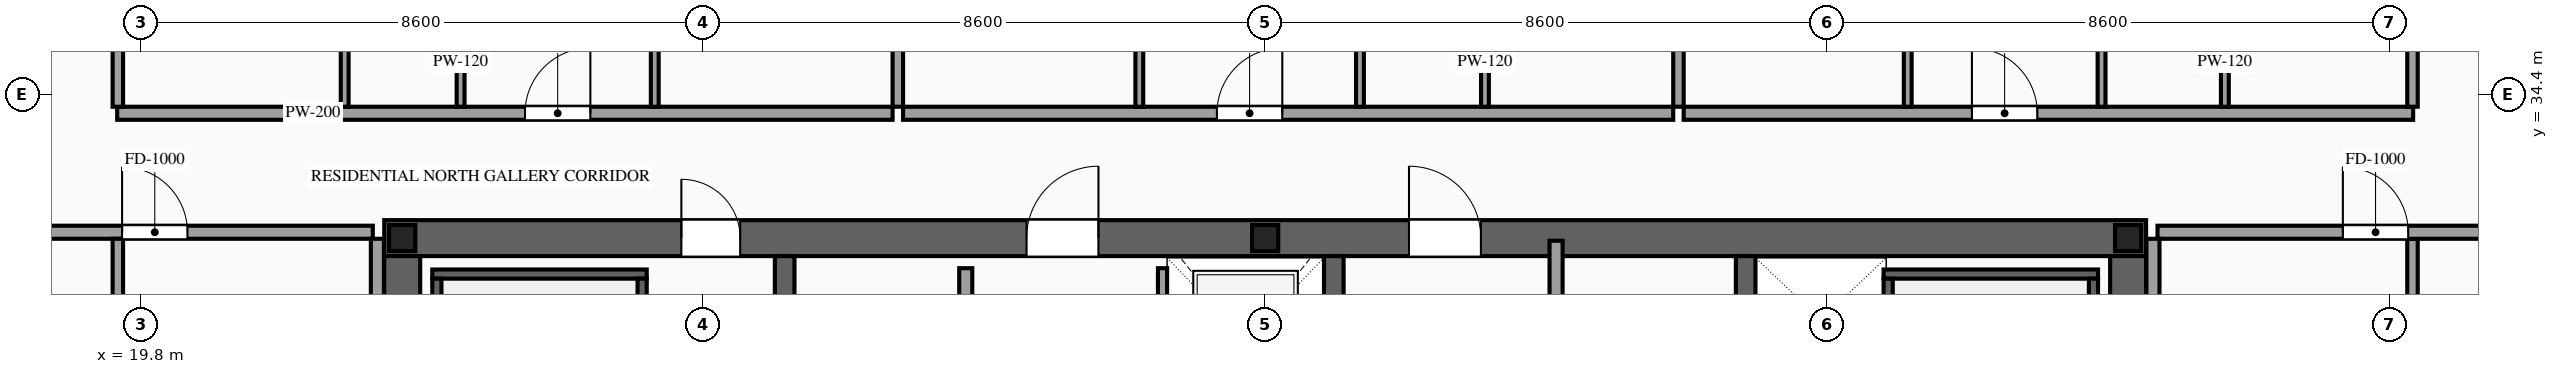
"""IFC4 building model, lengths in metres.
Left out: names, types, materials, properties, quantities, classifications, styles, units other than length and angle.
Written with IfcOpenShell. Run it as: python <this file> out.ifc"""

import sys

from ifc_helpers import new_model, si_unit, direction, frame, frame_2d, origin, origin_2d, place, context, subcontext, project, spatial, rectangle, i_section, extrude, source, transform, mapped, element, fill, save


model = new_model("IFC4")
c1 = context("Model", 3, precision=1e-05, world=origin(), true_north=direction((0.0, 1.0)))
c2 = subcontext(c1, "Body", "Model", "MODEL_VIEW")
j1 = project(units=[si_unit("LENGTHUNIT", "METRE"), si_unit("PLANEANGLEUNIT", "RADIAN")], contexts=[c1])
p1 = place(None, origin())
s1 = spatial("IfcSite", under=j1, at=p1, CompositionType="ELEMENT")
p2 = place(p1, origin())
s2 = spatial("IfcBuilding", under=s1, at=p2, CompositionType="ELEMENT")
p3 = place(p2, frame((0.0, 0.0, 248.6)))
s3 = spatial("IfcBuildingStorey", under=s2, at=p3, CompositionType="ELEMENT", Elevation=248.6)
p4 = place(p3, frame((23.525, 32.2, 0.0), z_axis=(0.0, 0.0, 1.0), x_axis=(1.0, 0.0, 0.0)))
e1 = element("IfcWall", 1, at=p4, inside=s3, PredefinedType="SHEAR", context=c2, shape_type="SweptSolid", body=[
    extrude(rectangle(XDim=26.95, YDim=0.55, at=frame_2d((13.475, 0.0))), origin(), (0.0, 0.0, 1.0), 3.5),
])
p5 = place(p4, frame((4.545, 0.0, 0.0)))
e2 = element("IfcOpeningElement", 2, at=p5, cuts=e1, PredefinedType="OPENING", context=c2, shape_type="SweptSolid", body=[
    extrude(rectangle(XDim=0.9, YDim=2.15, at=frame_2d((0.45, 1.075))), frame((0.0, 0.29, 0.0), z_axis=(0.0, -1.0, 0.0), x_axis=(1.0, 0.0, 0.0)), (0.0, 0.0, 1.0), 0.58),
])
p6 = place(p4, frame((9.825, 0.0, 0.0)))
e3 = element("IfcOpeningElement", 3, at=p6, cuts=e1, PredefinedType="OPENING", context=c2, shape_type="SweptSolid", body=[
    extrude(rectangle(XDim=1.1, YDim=2.2, at=frame_2d((0.55, 1.1))), frame((0.0, 0.29, 0.0), z_axis=(0.0, -1.0, 0.0), x_axis=(1.0, 0.0, 0.0)), (0.0, 0.0, 1.0), 0.58),
])
p7 = place(p4, frame((15.675, 0.0, 0.0)))
e4 = element("IfcOpeningElement", 4, at=p7, cuts=e1, PredefinedType="OPENING", context=c2, shape_type="SweptSolid", body=[
    extrude(rectangle(XDim=1.1, YDim=2.2, at=frame_2d((0.55, 1.1))), frame((0.0, 0.29, 0.0), z_axis=(0.0, -1.0, 0.0), x_axis=(1.0, 0.0, 0.0)), (0.0, 0.0, 1.0), 0.58),
])
m1 = source(origin(), c2, "Body", "SweptSolid", [
    extrude(rectangle(XDim=12.25, YDim=0.55, at=frame_2d((6.125, 0.0))), origin(), (0.0, 0.0, 1.0), 3.5),
])
for number, where, z_axis, x_axis in (
    (5, (23.8, 19.675, 0.0), (0.0, 0.0, 1.0), (0.0, 1.0, 0.0)),
    (6, (50.2, 19.675, 0.0), (0.0, 0.0, 1.0), (0.0, 1.0, 0.0)),
):
    element("IfcWall", number, at=place(p3, frame(where, z_axis=z_axis, x_axis=x_axis)), inside=s3, PredefinedType="SHEAR", context=c2, shape_type="MappedRepresentation", body=[
        mapped(m1, transform((0.0, 0.0, 0.0), scale=1.0)),
    ])
m2 = source(origin(), c2, "Body", "SweptSolid", [
    extrude(rectangle(XDim=12.25, YDim=0.3, at=frame_2d((6.125, 0.0))), origin(), (0.0, 0.0, 1.0), 3.5),
])
for number, where, z_axis, x_axis in (
    (7, (29.65, 19.675, 0.0), (0.0, 0.0, 1.0), (0.0, 1.0, 0.0)),
    (8, (38.05, 19.675, 0.0), (0.0, 0.0, 1.0), (0.0, 1.0, 0.0)),
    (9, (44.35, 19.675, 0.0), (0.0, 0.0, 1.0), (0.0, 1.0, 0.0)),
):
    element("IfcWall", number, at=place(p3, frame(where, z_axis=z_axis, x_axis=x_axis)), inside=s3, PredefinedType="SOLIDWALL", context=c2, shape_type="MappedRepresentation", body=[
        mapped(m2, transform((0.0, 0.0, 0.0), scale=1.0)),
    ])
m3 = source(origin(), c2, "Body", "SweptSolid", [
    extrude(i_section(OverallWidth=0.4, OverallDepth=0.4, WebThickness=0.013, FlangeThickness=0.021, at=origin_2d()), origin(), (0.0, 0.0, 1.0), 3.5),
])
for number, where, z_axis, x_axis in (
    (10, (23.8, 32.2, 0.0), (0.0, 0.0, 1.0), (1.0, 0.0, 0.0)),
    (11, (37.0, 32.2, 0.0), (0.0, 0.0, 1.0), (1.0, 0.0, 0.0)),
    (12, (50.2, 32.2, 0.0), (0.0, 0.0, 1.0), (1.0, 0.0, 0.0)),
):
    element("IfcColumn", number, at=place(p3, frame(where, z_axis=z_axis, x_axis=x_axis)), inside=s3, PredefinedType="COLUMN", context=c2, shape_type="MappedRepresentation", body=[
        mapped(m3, transform((0.0, 0.0, 0.0), scale=1.0)),
    ])
p8 = place(p3, frame((35.43, 29.4, 0.0), z_axis=(0.0, 0.0, 1.0), x_axis=(0.0, 1.0, 0.0)))
e13 = element("IfcWall", 13, at=p8, inside=s3, PredefinedType="SOLIDWALL", context=c2, shape_type="SweptSolid", body=[
    extrude(rectangle(XDim=2.34, YDim=0.14, at=frame_2d((1.17, 0.0))), origin(), (0.0, 0.0, 1.0), 3.28),
])
p9 = place(p8, frame((0.62, 0.0, 0.0)))
e14 = element("IfcOpeningElement", 14, at=p9, cuts=e13, PredefinedType="OPENING", context=c2, shape_type="SweptSolid", body=[
    extrude(rectangle(XDim=1.1, YDim=2.2, at=frame_2d((0.55, 1.1))), frame((0.0, 0.085, 0.0), z_axis=(0.0, -1.0, 0.0), x_axis=(1.0, 0.0, 0.0)), (0.0, 0.0, 1.0), 0.17),
])
m4 = source(origin(), c2, "Body", "SweptSolid", [
    extrude(rectangle(XDim=3.28, YDim=0.14, at=frame_2d((1.64, 0.0))), origin(), (0.0, 0.0, 1.0), 3.28),
])
p10 = place(p3, frame((24.26, 31.65, 0.0), z_axis=(0.0, 0.0, 1.0), x_axis=(1.0, 0.0, 0.0)))
e15 = element("IfcWall", 15, at=p10, inside=s3, PredefinedType="SOLIDWALL", context=c2, shape_type="MappedRepresentation", body=[
    mapped(m4, transform((0.0, 0.0, 0.0), scale=1.0)),
])
m5 = source(origin(), c2, "Body", "SweptSolid", [
    extrude(rectangle(XDim=8.94, YDim=0.14, at=frame_2d((4.47, 0.0))), origin(), (0.0, 0.0, 1.0), 3.28),
])
for number, where, z_axis, x_axis in (
    (16, (24.33, 22.64, 0.0), (0.0, 0.0, 1.0), (0.0, 1.0, 0.0)),
    (17, (27.47, 22.64, 0.0), (0.0, 0.0, 1.0), (0.0, 1.0, 0.0)),
):
    element("IfcWall", number, at=place(p3, frame(where, z_axis=z_axis, x_axis=x_axis)), inside=s3, PredefinedType="SOLIDWALL", context=c2, shape_type="MappedRepresentation", body=[
        mapped(m5, transform((0.0, 0.0, 0.0), scale=1.0)),
    ])
p11 = place(p3, frame((46.46, 31.65, 0.0), z_axis=(0.0, 0.0, 1.0), x_axis=(1.0, 0.0, 0.0)))
e18 = element("IfcWall", 18, at=p11, inside=s3, PredefinedType="SOLIDWALL", context=c2, shape_type="MappedRepresentation", body=[
    mapped(m4, transform((0.0, 0.0, 0.0), scale=1.0)),
])
for number, where, z_axis, x_axis in (
    (19, (46.53, 22.64, 0.0), (0.0, 0.0, 1.0), (0.0, 1.0, 0.0)),
    (20, (49.67, 22.64, 0.0), (0.0, 0.0, 1.0), (0.0, 1.0, 0.0)),
):
    element("IfcWall", number, at=place(p3, frame(where, z_axis=z_axis, x_axis=x_axis)), inside=s3, PredefinedType="SOLIDWALL", context=c2, shape_type="MappedRepresentation", body=[
        mapped(m5, transform((0.0, 0.0, 0.0), scale=1.0)),
    ])
p12 = place(p3, frame((32.42, 19.86, 0.0), z_axis=(0.0, 0.0, 1.0), x_axis=(0.0, 1.0, 0.0)))
e21 = element("IfcWall", 21, at=p12, inside=s3, PredefinedType="PARTITIONING", context=c2, shape_type="SweptSolid", body=[
    extrude(rectangle(XDim=11.88, YDim=0.2, at=frame_2d((5.94, 0.0))), origin(), (0.0, 0.0, 1.0), 3.28),
])
p13 = place(p12, frame((5.49, 0.0, 0.0)))
e22 = element("IfcOpeningElement", 22, at=p13, cuts=e21, PredefinedType="OPENING", context=c2, shape_type="SweptSolid", body=[
    extrude(rectangle(XDim=0.9, YDim=2.15, at=frame_2d((0.45, 1.075))), frame((0.0, 0.115, 0.0), z_axis=(0.0, -1.0, 0.0), x_axis=(1.0, 0.0, 0.0)), (0.0, 0.0, 1.0), 0.23),
])
m6 = source(origin(), c2, "Body", "SweptSolid", [
    extrude(rectangle(XDim=12.72, YDim=0.2, at=frame_2d((6.36, 0.0))), origin(), (0.0, 0.0, 1.0), 3.28),
])
p14 = place(p3, frame((41.45, 19.44, 0.0), z_axis=(0.0, 0.0, 1.0), x_axis=(0.0, 1.0, 0.0)))
e23 = element("IfcWall", 23, at=p14, inside=s3, PredefinedType="PARTITIONING", context=c2, shape_type="MappedRepresentation", body=[
    mapped(m6, transform((0.0, 0.0, 0.0), scale=1.0)),
])
p15 = place(p3, frame((19.44, 34.11, 0.0), z_axis=(0.0, 0.0, 1.0), x_axis=(1.0, 0.0, 0.0)))
e24 = element("IfcWall", 24, at=p15, inside=s3, PredefinedType="PARTITIONING", context=c2, shape_type="SweptSolid", body=[
    extrude(rectangle(XDim=11.861, YDim=0.2, at=frame_2d((5.931, 0.0))), origin(), (0.0, 0.0, 1.0), 3.28),
])
p16 = place(p15, frame((6.238, 0.0, 0.0)))
e25 = element("IfcOpeningElement", 25, at=p16, cuts=e24, PredefinedType="OPENING", context=c2, shape_type="SweptSolid", body=[
    extrude(rectangle(XDim=1.0, YDim=2.2, at=frame_2d((0.5, 1.1))), frame((0.0, 0.115, 0.0), z_axis=(0.0, -1.0, 0.0), x_axis=(1.0, 0.0, 0.0)), (0.0, 0.0, 1.0), 0.23),
])
m7 = source(origin(), c2, "Body", "SweptSolid", [
    extrude(rectangle(XDim=12.04, YDim=0.16, at=frame_2d((6.02, 0.0))), origin(), (0.0, 0.0, 1.0), 3.28),
])
p17 = place(p3, frame((31.381, 34.21, 0.0), z_axis=(0.0, 0.0, 1.0), x_axis=(0.0, 1.0, 0.0)))
e26 = element("IfcWall", 26, at=p17, inside=s3, PredefinedType="PARTITIONING", context=c2, shape_type="MappedRepresentation", body=[
    mapped(m7, transform((0.0, 0.0, 0.0), scale=1.0)),
])
m8 = source(origin(), c2, "Body", "SweptSolid", [
    extrude(rectangle(XDim=4.11, YDim=0.12, at=frame_2d((2.055, 0.0))), origin(), (0.0, 0.0, 1.0), 3.28),
])
p18 = place(p3, frame((22.92, 34.21, 0.0), z_axis=(0.0, 0.0, 1.0), x_axis=(0.0, 1.0, 0.0)))
e27 = element("IfcWall", 27, at=p18, inside=s3, PredefinedType="PARTITIONING", context=c2, shape_type="MappedRepresentation", body=[
    mapped(m8, transform((0.0, 0.0, 0.0), scale=1.0)),
])
p19 = place(p3, frame((24.693, 34.21, 0.0), z_axis=(0.0, 0.0, 1.0), x_axis=(0.0, 1.0, 0.0)))
e28 = element("IfcWall", 28, at=p19, inside=s3, PredefinedType="PARTITIONING", context=c2, shape_type="SweptSolid", body=[
    extrude(rectangle(XDim=4.11, YDim=0.12, at=frame_2d((2.055, 0.0))), origin(), (0.0, 0.0, 1.0), 3.28),
])
p20 = place(p19, frame((1.63, 0.0, 0.0)))
e29 = element("IfcOpeningElement", 29, at=p20, cuts=e28, PredefinedType="OPENING", context=c2, shape_type="SweptSolid", body=[
    extrude(rectangle(XDim=0.85, YDim=2.1, at=frame_2d((0.425, 1.05))), frame((0.0, 0.075, 0.0), z_axis=(0.0, -1.0, 0.0), x_axis=(1.0, 0.0, 0.0)), (0.0, 0.0, 1.0), 0.15),
])
p21 = place(p3, frame((27.663, 34.21, 0.0), z_axis=(0.0, 0.0, 1.0), x_axis=(0.0, 1.0, 0.0)))
e30 = element("IfcWall", 30, at=p21, inside=s3, PredefinedType="PARTITIONING", context=c2, shape_type="MappedRepresentation", body=[
    mapped(m8, transform((0.0, 0.0, 0.0), scale=1.0)),
])
p22 = place(p3, frame((31.461, 34.11, 0.0), z_axis=(0.0, 0.0, 1.0), x_axis=(1.0, 0.0, 0.0)))
e31 = element("IfcWall", 31, at=p22, inside=s3, PredefinedType="PARTITIONING", context=c2, shape_type="SweptSolid", body=[
    extrude(rectangle(XDim=11.781, YDim=0.2, at=frame_2d((5.891, 0.0))), origin(), (0.0, 0.0, 1.0), 3.28),
])
p23 = place(p22, frame((4.801, 0.0, 0.0)))
e32 = element("IfcOpeningElement", 32, at=p23, cuts=e31, PredefinedType="OPENING", context=c2, shape_type="SweptSolid", body=[
    extrude(rectangle(XDim=1.0, YDim=2.2, at=frame_2d((0.5, 1.1))), frame((0.0, 0.115, 0.0), z_axis=(0.0, -1.0, 0.0), x_axis=(1.0, 0.0, 0.0)), (0.0, 0.0, 1.0), 0.23),
])
p24 = place(p3, frame((43.322, 34.21, 0.0), z_axis=(0.0, 0.0, 1.0), x_axis=(0.0, 1.0, 0.0)))
e33 = element("IfcWall", 33, at=p24, inside=s3, PredefinedType="PARTITIONING", context=c2, shape_type="MappedRepresentation", body=[
    mapped(m7, transform((0.0, 0.0, 0.0), scale=1.0)),
])
p25 = place(p3, frame((35.075, 34.21, 0.0), z_axis=(0.0, 0.0, 1.0), x_axis=(0.0, 1.0, 0.0)))
e34 = element("IfcWall", 34, at=p25, inside=s3, PredefinedType="PARTITIONING", context=c2, shape_type="MappedRepresentation", body=[
    mapped(m8, transform((0.0, 0.0, 0.0), scale=1.0)),
])
p26 = place(p3, frame((40.362, 34.21, 0.0), z_axis=(0.0, 0.0, 1.0), x_axis=(0.0, 1.0, 0.0)))
e35 = element("IfcWall", 35, at=p26, inside=s3, PredefinedType="PARTITIONING", context=c2, shape_type="SweptSolid", body=[
    extrude(rectangle(XDim=4.11, YDim=0.12, at=frame_2d((2.055, 0.0))), origin(), (0.0, 0.0, 1.0), 3.28),
])
p27 = place(p26, frame((1.63, 0.0, 0.0)))
e36 = element("IfcOpeningElement", 36, at=p27, cuts=e35, PredefinedType="OPENING", context=c2, shape_type="SweptSolid", body=[
    extrude(rectangle(XDim=0.85, YDim=2.1, at=frame_2d((0.425, 1.05))), frame((0.0, 0.075, 0.0), z_axis=(0.0, -1.0, 0.0), x_axis=(1.0, 0.0, 0.0)), (0.0, 0.0, 1.0), 0.15),
])
p28 = place(p3, frame((38.45, 34.21, 0.0), z_axis=(0.0, 0.0, 1.0), x_axis=(0.0, 1.0, 0.0)))
e37 = element("IfcWall", 37, at=p28, inside=s3, PredefinedType="PARTITIONING", context=c2, shape_type="SweptSolid", body=[
    extrude(rectangle(XDim=4.11, YDim=0.12, at=frame_2d((2.055, 0.0))), origin(), (0.0, 0.0, 1.0), 3.28),
])
p29 = place(p28, frame((1.63, 0.0, 0.0)))
e38 = element("IfcOpeningElement", 38, at=p29, cuts=e37, PredefinedType="OPENING", context=c2, shape_type="SweptSolid", body=[
    extrude(rectangle(XDim=0.85, YDim=2.1, at=frame_2d((0.425, 1.05))), frame((0.0, 0.075, 0.0), z_axis=(0.0, -1.0, 0.0), x_axis=(1.0, 0.0, 0.0)), (0.0, 0.0, 1.0), 0.15),
])
p30 = place(p3, frame((43.402, 34.11, 0.0), z_axis=(0.0, 0.0, 1.0), x_axis=(1.0, 0.0, 0.0)))
e39 = element("IfcWall", 39, at=p30, inside=s3, PredefinedType="PARTITIONING", context=c2, shape_type="SweptSolid", body=[
    extrude(rectangle(XDim=11.158, YDim=0.2, at=frame_2d((5.579, 0.0))), origin(), (0.0, 0.0, 1.0), 3.28),
])
p31 = place(p30, frame((4.409, 0.0, 0.0)))
e40 = element("IfcOpeningElement", 40, at=p31, cuts=e39, PredefinedType="OPENING", context=c2, shape_type="SweptSolid", body=[
    extrude(rectangle(XDim=1.0, YDim=2.2, at=frame_2d((0.5, 1.1))), frame((0.0, 0.115, 0.0), z_axis=(0.0, -1.0, 0.0), x_axis=(1.0, 0.0, 0.0)), (0.0, 0.0, 1.0), 0.23),
])
m9 = source(origin(), c2, "Body", "SweptSolid", [
    extrude(rectangle(XDim=11.89, YDim=0.16, at=frame_2d((5.945, 0.0))), origin(), (0.0, 0.0, 1.0), 3.28),
])
for number, where, z_axis, x_axis in (
    (41, (19.45, 34.21, 0.0), (0.0, 0.0, 1.0), (0.0, 1.0, 0.0)),
    (42, (54.55, 34.21, 0.0), (0.0, 0.0, 1.0), (0.0, 1.0, 0.0)),
):
    element("IfcWall", number, at=place(p3, frame(where, z_axis=z_axis, x_axis=x_axis)), inside=s3, PredefinedType="PARTITIONING", context=c2, shape_type="MappedRepresentation", body=[
        mapped(m9, transform((0.0, 0.0, 0.0), scale=1.0)),
    ])
p32 = place(p3, frame((46.829, 34.21, 0.0), z_axis=(0.0, 0.0, 1.0), x_axis=(0.0, 1.0, 0.0)))
e43 = element("IfcWall", 43, at=p32, inside=s3, PredefinedType="PARTITIONING", context=c2, shape_type="MappedRepresentation", body=[
    mapped(m8, transform((0.0, 0.0, 0.0), scale=1.0)),
])
p33 = place(p3, frame((51.68, 34.21, 0.0), z_axis=(0.0, 0.0, 1.0), x_axis=(0.0, 1.0, 0.0)))
e44 = element("IfcWall", 44, at=p33, inside=s3, PredefinedType="PARTITIONING", context=c2, shape_type="SweptSolid", body=[
    extrude(rectangle(XDim=4.11, YDim=0.12, at=frame_2d((2.055, 0.0))), origin(), (0.0, 0.0, 1.0), 3.28),
])
p34 = place(p33, frame((1.63, 0.0, 0.0)))
e45 = element("IfcOpeningElement", 45, at=p34, cuts=e44, PredefinedType="OPENING", context=c2, shape_type="SweptSolid", body=[
    extrude(rectangle(XDim=0.85, YDim=2.1, at=frame_2d((0.425, 1.05))), frame((0.0, 0.075, 0.0), z_axis=(0.0, -1.0, 0.0), x_axis=(1.0, 0.0, 0.0)), (0.0, 0.0, 1.0), 0.15),
])
p35 = place(p3, frame((49.794, 34.21, 0.0), z_axis=(0.0, 0.0, 1.0), x_axis=(0.0, 1.0, 0.0)))
e46 = element("IfcWall", 46, at=p35, inside=s3, PredefinedType="PARTITIONING", context=c2, shape_type="SweptSolid", body=[
    extrude(rectangle(XDim=4.11, YDim=0.12, at=frame_2d((2.055, 0.0))), origin(), (0.0, 0.0, 1.0), 3.28),
])
p36 = place(p35, frame((1.63, 0.0, 0.0)))
e47 = element("IfcOpeningElement", 47, at=p36, cuts=e46, PredefinedType="OPENING", context=c2, shape_type="SweptSolid", body=[
    extrude(rectangle(XDim=0.85, YDim=2.1, at=frame_2d((0.425, 1.05))), frame((0.0, 0.075, 0.0), z_axis=(0.0, -1.0, 0.0), x_axis=(1.0, 0.0, 0.0)), (0.0, 0.0, 1.0), 0.15),
])
p37 = place(p3, frame((16.55, 32.29, 0.0), z_axis=(0.0, 0.0, 1.0), x_axis=(1.0, 0.0, 0.0)))
e48 = element("IfcWall", 48, at=p37, inside=s3, PredefinedType="PARTITIONING", context=c2, shape_type="SweptSolid", body=[
    extrude(rectangle(XDim=6.8, YDim=0.2, at=frame_2d((3.4, 0.0))), origin(), (0.0, 0.0, 1.0), 2.825),
])
p38 = place(p37, frame((2.965, 0.0, 0.0)))
e49 = element("IfcOpeningElement", 49, at=p38, cuts=e48, PredefinedType="OPENING", context=c2, shape_type="SweptSolid", body=[
    extrude(rectangle(XDim=1.0, YDim=2.2, at=frame_2d((0.5, 1.1))), frame((0.0, 0.115, 0.0), z_axis=(0.0, -1.0, 0.0), x_axis=(1.0, 0.0, 0.0)), (0.0, 0.0, 1.0), 0.23),
])
m10 = source(origin(), c2, "Body", "SweptSolid", [
    extrude(rectangle(XDim=26.69, YDim=0.16, at=frame_2d((13.345, 0.0))), origin(), (0.0, 0.0, 1.0), 3.28),
])
for number, where, z_axis, x_axis in (
    (50, (19.45, 5.5, 0.0), (0.0, 0.0, 1.0), (0.0, 1.0, 0.0)),
    (51, (54.55, 5.5, 0.0), (0.0, 0.0, 1.0), (0.0, 1.0, 0.0)),
):
    element("IfcWall", number, at=place(p3, frame(where, z_axis=z_axis, x_axis=x_axis)), inside=s3, PredefinedType="PARTITIONING", context=c2, shape_type="MappedRepresentation", body=[
        mapped(m10, transform((0.0, 0.0, 0.0), scale=1.0)),
    ])
m11 = source(origin(), c2, "Body", "SweptSolid", [
    extrude(rectangle(XDim=6.29, YDim=0.2, at=frame_2d((3.145, 0.0))), origin(), (0.0, 0.0, 1.0), 3.28),
])
p39 = place(p3, frame((23.42, 25.9, 0.0), z_axis=(0.0, 0.0, 1.0), x_axis=(0.0, 1.0, 0.0)))
e52 = element("IfcWall", 52, at=p39, inside=s3, PredefinedType="PARTITIONING", context=c2, shape_type="MappedRepresentation", body=[
    mapped(m11, transform((0.0, 0.0, 0.0), scale=1.0)),
])
p40 = place(p3, frame((50.65, 32.29, 0.0), z_axis=(0.0, 0.0, 1.0), x_axis=(1.0, 0.0, 0.0)))
e53 = element("IfcWall", 53, at=p40, inside=s3, PredefinedType="PARTITIONING", context=c2, shape_type="SweptSolid", body=[
    extrude(rectangle(XDim=6.8, YDim=0.2, at=frame_2d((3.4, 0.0))), origin(), (0.0, 0.0, 1.0), 2.825),
])
p41 = place(p40, frame((2.835, 0.0, 0.0)))
e54 = element("IfcOpeningElement", 54, at=p41, cuts=e53, PredefinedType="OPENING", context=c2, shape_type="SweptSolid", body=[
    extrude(rectangle(XDim=1.0, YDim=2.2, at=frame_2d((0.5, 1.1))), frame((0.0, 0.115, 0.0), z_axis=(0.0, -1.0, 0.0), x_axis=(1.0, 0.0, 0.0)), (0.0, 0.0, 1.0), 0.23),
])
p42 = place(p3, frame((50.58, 25.9, 0.0), z_axis=(0.0, 0.0, 1.0), x_axis=(0.0, 1.0, 0.0)))
e55 = element("IfcWall", 55, at=p42, inside=s3, PredefinedType="PARTITIONING", context=c2, shape_type="MappedRepresentation", body=[
    mapped(m11, transform((0.0, 0.0, 0.0), scale=1.0)),
])
m12 = source(origin(), c2, "Body", "SweptSolid", [
    extrude(rectangle(XDim=0.9, YDim=2.15, at=frame_2d((0.45, 1.075))), frame((0.0, 0.025, 0.0), z_axis=(0.0, -1.0, 0.0), x_axis=(1.0, 0.0, 0.0)), (0.0, 0.0, 1.0), 0.05),
])
p43 = place(p5, origin())
e56 = element("IfcDoor", 56, at=p43, inside=s3, OperationType="SINGLE_SWING_LEFT", PredefinedType="DOOR", context=c2, shape_type="MappedRepresentation", body=[
    mapped(m12, transform((0.0, 0.0, 0.0), scale=1.0)),
])
fill(e2, e56)
m13 = source(origin(), c2, "Body", "SweptSolid", [
    extrude(rectangle(XDim=1.1, YDim=2.2, at=frame_2d((0.55, 1.1))), frame((0.0, 0.025, 0.0), z_axis=(0.0, -1.0, 0.0), x_axis=(1.0, 0.0, 0.0)), (0.0, 0.0, 1.0), 0.05),
])
p44 = place(p6, origin())
e57 = element("IfcDoor", 57, at=p44, inside=s3, OperationType="SINGLE_SWING_RIGHT", PredefinedType="DOOR", context=c2, shape_type="MappedRepresentation", body=[
    mapped(m13, transform((0.0, 0.0, 0.0), scale=1.0)),
])
fill(e3, e57)
p45 = place(p7, origin())
e58 = element("IfcDoor", 58, at=p45, inside=s3, OperationType="SINGLE_SWING_LEFT", PredefinedType="DOOR", context=c2, shape_type="MappedRepresentation", body=[
    mapped(m13, transform((0.0, 0.0, 0.0), scale=1.0)),
])
fill(e4, e58)
m14 = source(origin(), c2, "Body", "SweptSolid", [
    extrude(rectangle(XDim=1.0, YDim=2.2, at=frame_2d((0.5, 1.1))), frame((0.0, 0.025, 0.0), z_axis=(0.0, -1.0, 0.0), x_axis=(1.0, 0.0, 0.0)), (0.0, 0.0, 1.0), 0.05),
])
p46 = place(p16, origin())
e59 = element("IfcDoor", 59, at=p46, inside=s3, OperationType="SINGLE_SWING_RIGHT", PredefinedType="DOOR", context=c2, shape_type="MappedRepresentation", body=[
    mapped(m14, transform((0.0, 0.0, 0.0), scale=1.0)),
])
fill(e25, e59)
p47 = place(p23, origin())
e60 = element("IfcDoor", 60, at=p47, inside=s3, OperationType="SINGLE_SWING_RIGHT", PredefinedType="DOOR", context=c2, shape_type="MappedRepresentation", body=[
    mapped(m14, transform((0.0, 0.0, 0.0), scale=1.0)),
])
fill(e32, e60)
p48 = place(p31, origin())
e61 = element("IfcDoor", 61, at=p48, inside=s3, OperationType="SINGLE_SWING_LEFT", PredefinedType="DOOR", context=c2, shape_type="MappedRepresentation", body=[
    mapped(m14, transform((0.0, 0.0, 0.0), scale=1.0)),
])
fill(e40, e61)
p49 = place(p38, origin())
e62 = element("IfcDoor", 62, at=p49, inside=s3, OperationType="SINGLE_SWING_LEFT", PredefinedType="DOOR", context=c2, shape_type="MappedRepresentation", body=[
    mapped(m14, transform((0.0, 0.0, 0.0), scale=1.0)),
])
fill(e49, e62)
p50 = place(p41, origin())
e63 = element("IfcDoor", 63, at=p50, inside=s3, OperationType="SINGLE_SWING_LEFT", PredefinedType="DOOR", context=c2, shape_type="MappedRepresentation", body=[
    mapped(m14, transform((0.0, 0.0, 0.0), scale=1.0)),
])
fill(e54, e63)
save(model, sys.argv[1])
